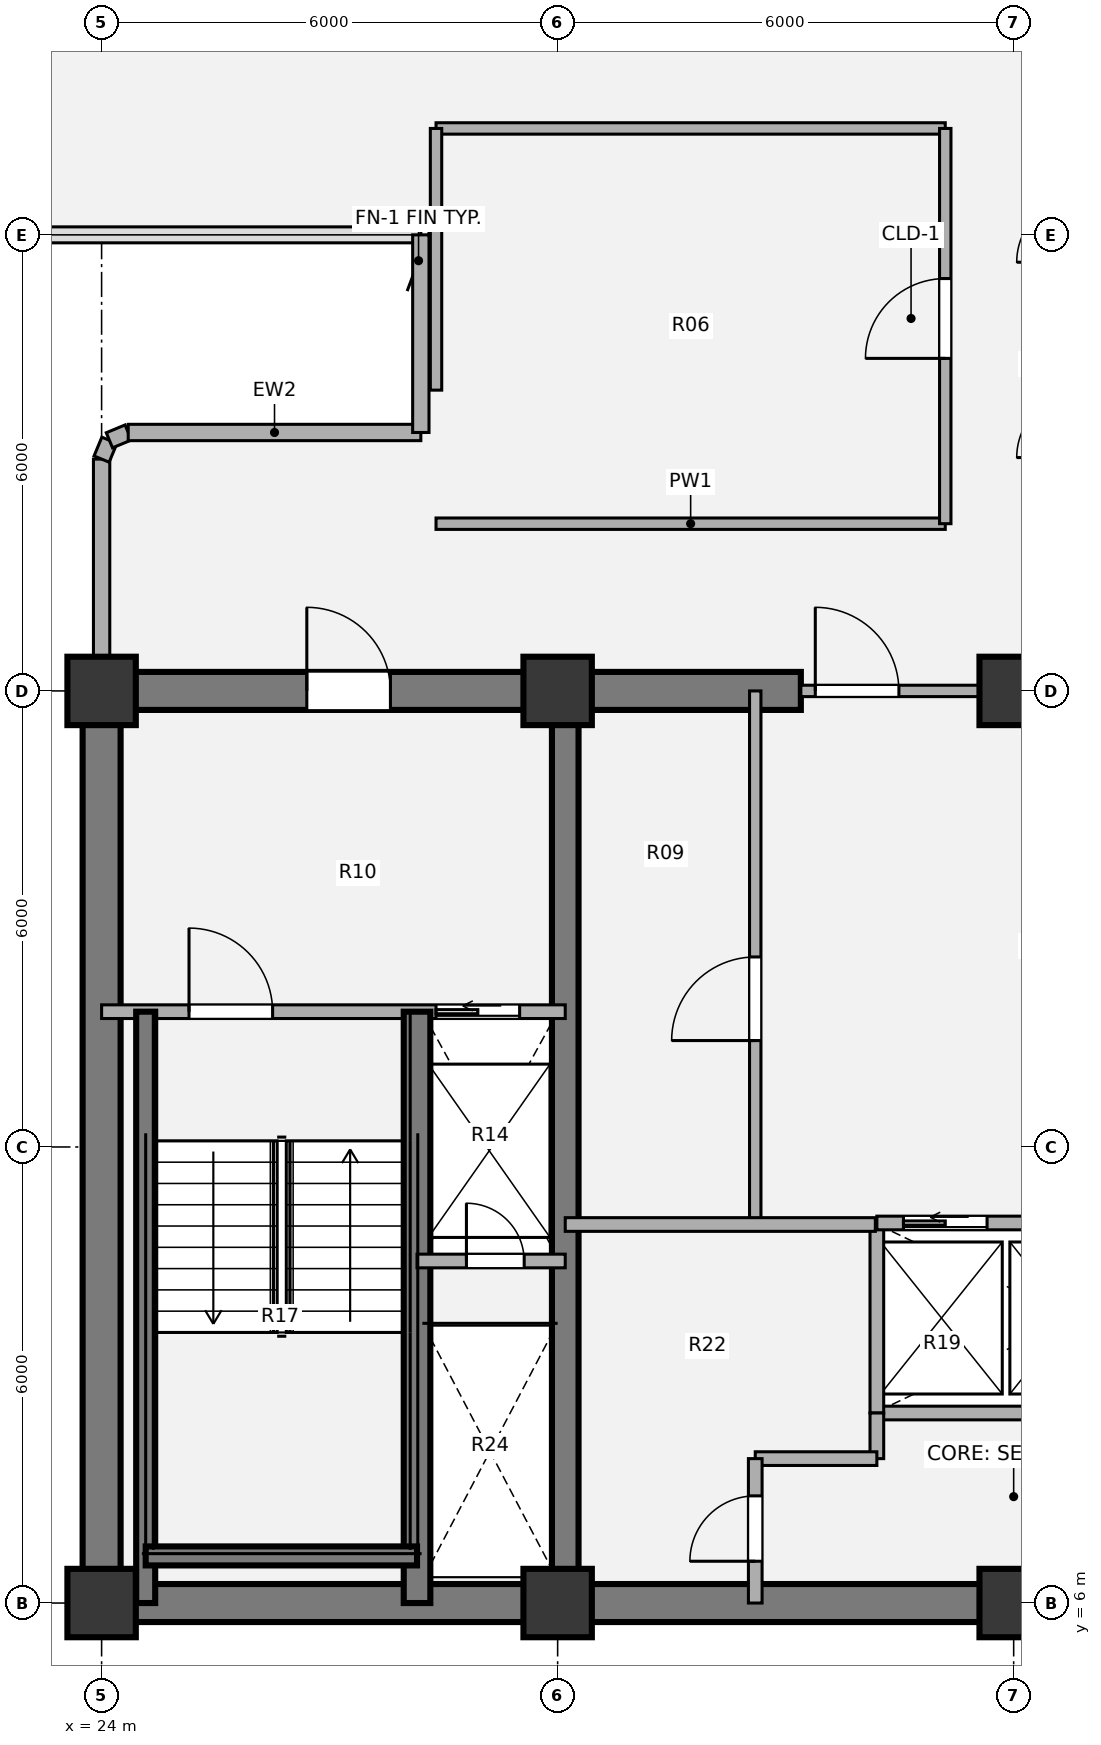
"""IFC4 building model, lengths in metres.
Left out: names, types, materials, properties, quantities, classifications, styles, units other than length and angle.
Written with IfcOpenShell. Run it as: python <this file> out.ifc"""

import sys

from ifc_helpers import new_model, si_unit, direction, frame, frame_2d, origin, origin_2d, place, context, subcontext, project, spatial, rectangle, extrude, source, transform, mapped, element, fill, save


model = new_model("IFC4")
c1 = context("Model", 3, precision=1e-05, world=origin(), true_north=direction((0.0, 1.0)))
c2 = subcontext(c1, "Body", "Model", "MODEL_VIEW")
j1 = project(units=[si_unit("LENGTHUNIT", "METRE"), si_unit("PLANEANGLEUNIT", "RADIAN")], contexts=[c1])
p1 = place(None, origin())
s1 = spatial("IfcSite", under=j1, at=p1, CompositionType="ELEMENT")
p2 = place(p1, origin())
s2 = spatial("IfcBuilding", under=s1, at=p2, CompositionType="ELEMENT")
p3 = place(p2, frame((0.0, 0.0, 123.84)))
s3 = spatial("IfcBuildingStorey", under=s2, at=p3, CompositionType="ELEMENT", Elevation=123.84)
m1 = source(origin(), c2, "Body", "SweptSolid", [
    extrude(rectangle(XDim=0.9, YDim=0.9, at=origin_2d()), origin(), (0.0, 0.0, 1.0), 3.78),
])
for number, where, z_axis, x_axis in (
    (1, (24.0, 6.0, 0.0), (0.0, 0.0, 1.0), (1.0, 0.0, 0.0)),
    (2, (30.0, 6.0, 0.0), (0.0, 0.0, 1.0), (1.0, 0.0, 0.0)),
    (3, (36.0, 6.0, 0.0), (0.0, 0.0, 1.0), (1.0, 0.0, 0.0)),
    (4, (24.0, 18.0, 0.0), (0.0, 0.0, 1.0), (1.0, 0.0, 0.0)),
    (5, (30.0, 18.0, 0.0), (0.0, 0.0, 1.0), (1.0, 0.0, 0.0)),
    (6, (36.0, 18.0, 0.0), (0.0, 0.0, 1.0), (1.0, 0.0, 0.0)),
):
    element("IfcColumn", number, at=place(p3, frame(where, z_axis=z_axis, x_axis=x_axis)), inside=s3, PredefinedType="COLUMN", context=c2, shape_type="MappedRepresentation", body=[
        mapped(m1, transform((0.0, 0.0, 0.0), x_axis=(1.0, 0.0, 0.0), y_axis=(0.0, 1.0, 0.0), z_axis=(0.0, 0.0, 1.0), scale=1.0)),
    ])
p4 = place(p3, frame((48.25, 6.0, 0.0), z_axis=(0.0, 0.0, 1.0), x_axis=(-1.0, 0.0, 0.0)))
e7 = element("IfcWall", 7, at=p4, inside=s3, PredefinedType="SHEAR", context=c2, shape_type="SweptSolid", body=[
    extrude(rectangle(XDim=24.5, YDim=0.5, at=frame_2d((12.25, 0.0))), origin(), (0.0, 0.0, 1.0), 3.78),
])
p5 = place(p3, frame((24.0, 6.0, 0.0), z_axis=(0.0, 0.0, 1.0), x_axis=(0.0, 1.0, 0.0)))
e8 = element("IfcWall", 8, at=p5, inside=s3, PredefinedType="SHEAR", context=c2, shape_type="SweptSolid", body=[
    extrude(rectangle(XDim=12.0, YDim=0.5, at=frame_2d((6.0, 0.0))), origin(), (0.0, 0.0, 1.0), 3.78),
])
p6 = place(p3, frame((23.75, 18.0, 0.0), z_axis=(0.0, 0.0, 1.0), x_axis=(1.0, 0.0, 0.0)))
e9 = element("IfcWall", 9, at=p6, inside=s3, PredefinedType="SHEAR", context=c2, shape_type="SweptSolid", body=[
    extrude(rectangle(XDim=9.45, YDim=0.5, at=frame_2d((4.725, 0.0))), origin(), (0.0, 0.0, 1.0), 3.78),
])
p7 = place(p6, frame((2.95, 0.0, 0.0)))
e10 = element("IfcOpeningElement", 10, at=p7, cuts=e9, PredefinedType="OPENING", context=c2, shape_type="SweptSolid", body=[
    extrude(rectangle(XDim=1.1, YDim=2.1, at=origin_2d()), frame((0.55, 0.26, 1.05), z_axis=(0.0, -1.0, 0.0), x_axis=(1.0, 0.0, 0.0)), (0.0, 0.0, 1.0), 0.52),
])
p8 = place(p3, frame((30.1, 6.0, 0.0), z_axis=(0.0, 0.0, 1.0), x_axis=(0.0, 1.0, 0.0)))
e11 = element("IfcWall", 11, at=p8, inside=s3, PredefinedType="SHEAR", context=c2, shape_type="SweptSolid", body=[
    extrude(rectangle(XDim=12.0, YDim=0.35, at=frame_2d((6.0, 0.0))), origin(), (0.0, 0.0, 1.0), 3.78),
])
p9 = place(p3, frame((24.0, 18.43, 0.0), z_axis=(0.0, 0.0, 1.0), x_axis=(0.0, 1.0, 0.0)))
e12 = element("IfcWall", 12, at=p9, inside=s3, PredefinedType="SOLIDWALL", context=c2, shape_type="SweptSolid", body=[
    extrude(rectangle(XDim=2.62, YDim=0.215, at=frame_2d((1.31, 0.0))), origin(), (0.0, 0.0, 1.0), 3.53),
])
p10 = place(p3, frame((24.0, 21.05, 0.0), z_axis=(0.0, 0.0, 1.0), x_axis=(0.382673670509, 0.923883575944, 0.0)))
e13 = element("IfcWall", 13, at=p10, inside=s3, PredefinedType="SOLIDWALL", context=c2, shape_type="SweptSolid", body=[
    extrude(rectangle(XDim=0.268, YDim=0.215, at=frame_2d((0.134, 0.0))), origin(), (0.0, 0.0, 1.0), 3.53),
])
p11 = place(p3, frame((24.103, 21.298, 0.0), z_axis=(0.0, 0.0, 1.0), x_axis=(0.924205486139, 0.381895560841, 0.0)))
e14 = element("IfcWall", 14, at=p11, inside=s3, PredefinedType="SOLIDWALL", context=c2, shape_type="SweptSolid", body=[
    extrude(rectangle(XDim=0.268, YDim=0.215, at=frame_2d((0.134, 0.0))), origin(), (0.0, 0.0, 1.0), 3.53),
])
p12 = place(p3, frame((24.35, 21.4, 0.0), z_axis=(0.0, 0.0, 1.0), x_axis=(1.0, 0.0, 0.0)))
e15 = element("IfcWall", 15, at=p12, inside=s3, PredefinedType="SOLIDWALL", context=c2, shape_type="SweptSolid", body=[
    extrude(rectangle(XDim=3.85, YDim=0.215, at=frame_2d((1.925, 0.0))), origin(), (0.0, 0.0, 1.0), 3.53),
])
p13 = place(p3, frame((28.2, 21.4, 0.0), z_axis=(0.0, 0.0, 1.0), x_axis=(0.0, 1.0, 0.0)))
e16 = element("IfcWall", 16, at=p13, inside=s3, PredefinedType="SOLIDWALL", context=c2, shape_type="SweptSolid", body=[
    extrude(rectangle(XDim=2.6, YDim=0.215, at=frame_2d((1.3, 0.0))), origin(), (0.0, 0.0, 1.0), 3.53),
])
p14 = place(p3, frame((32.6, 11.0, 0.0), z_axis=(0.0, 0.0, 1.0), x_axis=(0.0, 1.0, 0.0)))
e17 = element("IfcWall", 17, at=p14, inside=s3, PredefinedType="PARTITIONING", context=c2, shape_type="SweptSolid", body=[
    extrude(rectangle(XDim=7.0, YDim=0.15, at=frame_2d((3.5, 0.0))), origin(), (0.0, 0.0, 1.0), 3.5),
])
p15 = place(p14, frame((2.4, 0.0, 0.0)))
e18 = element("IfcOpeningElement", 18, at=p15, cuts=e17, PredefinedType="OPENING", context=c2, shape_type="SweptSolid", body=[
    extrude(rectangle(XDim=1.1, YDim=2.1, at=origin_2d()), frame((0.55, 0.085, 1.05), z_axis=(0.0, -1.0, 0.0), x_axis=(1.0, 0.0, 0.0)), (0.0, 0.0, 1.0), 0.17),
])
p16 = place(p3, frame((34.2, 8.5, 0.0), z_axis=(0.0, 0.0, 1.0), x_axis=(1.0, 0.0, 0.0)))
e19 = element("IfcWall", 19, at=p16, inside=s3, PredefinedType="PARTITIONING", context=c2, shape_type="SweptSolid", body=[
    extrude(rectangle(XDim=5.15, YDim=0.18, at=frame_2d((2.575, 0.0))), origin(), (0.0, 0.0, 1.0), 3.5),
])
p17 = place(p3, frame((34.2, 8.5, 0.0), z_axis=(0.0, 0.0, 1.0), x_axis=(0.0, 1.0, 0.0)))
e20 = element("IfcWall", 20, at=p17, inside=s3, PredefinedType="PARTITIONING", context=c2, shape_type="SweptSolid", body=[
    extrude(rectangle(XDim=2.5, YDim=0.18, at=frame_2d((1.25, 0.0))), origin(), (0.0, 0.0, 1.0), 3.5),
])
p18 = place(p3, frame((30.1, 10.98, 0.0), z_axis=(0.0, 0.0, 1.0), x_axis=(1.0, 0.0, 0.0)))
e21 = element("IfcWall", 21, at=p18, inside=s3, PredefinedType="PARTITIONING", context=c2, shape_type="SweptSolid", body=[
    extrude(rectangle(XDim=4.08, YDim=0.18, at=frame_2d((2.04, 0.0))), origin(), (0.0, 0.0, 1.0), 3.5),
])
p19 = place(p3, frame((34.2, 7.9, 0.0), z_axis=(0.0, 0.0, 1.0), x_axis=(0.0, 1.0, 0.0)))
e22 = element("IfcWall", 22, at=p19, inside=s3, PredefinedType="PARTITIONING", context=c2, shape_type="SweptSolid", body=[
    extrude(rectangle(XDim=0.6, YDim=0.18, at=frame_2d((0.3, 0.0))), origin(), (0.0, 0.0, 1.0), 3.5),
])
p20 = place(p3, frame((32.6, 7.9, 0.0), z_axis=(0.0, 0.0, 1.0), x_axis=(1.0, 0.0, 0.0)))
e23 = element("IfcWall", 23, at=p20, inside=s3, PredefinedType="PARTITIONING", context=c2, shape_type="SweptSolid", body=[
    extrude(rectangle(XDim=1.6, YDim=0.18, at=frame_2d((0.8, 0.0))), origin(), (0.0, 0.0, 1.0), 3.5),
])
p21 = place(p3, frame((32.6, 6.0, 0.0), z_axis=(0.0, 0.0, 1.0), x_axis=(0.0, 1.0, 0.0)))
e24 = element("IfcWall", 24, at=p21, inside=s3, PredefinedType="PARTITIONING", context=c2, shape_type="SweptSolid", body=[
    extrude(rectangle(XDim=1.9, YDim=0.18, at=frame_2d((0.95, 0.0))), origin(), (0.0, 0.0, 1.0), 3.5),
])
p22 = place(p21, frame((0.55, 0.0, 0.0)))
e25 = element("IfcOpeningElement", 25, at=p22, cuts=e24, PredefinedType="OPENING", context=c2, shape_type="SweptSolid", body=[
    extrude(rectangle(XDim=0.86, YDim=2.1, at=origin_2d()), frame((0.43, 0.1, 1.05), z_axis=(0.0, -1.0, 0.0), x_axis=(1.0, 0.0, 0.0)), (0.0, 0.0, 1.0), 0.2),
])
p23 = place(p3, frame((33.2, 18.0, 0.0), z_axis=(0.0, 0.0, 1.0), x_axis=(1.0, 0.0, 0.0)))
e26 = element("IfcWall", 26, at=p23, inside=s3, PredefinedType="PARTITIONING", context=c2, shape_type="SweptSolid", body=[
    extrude(rectangle(XDim=5.6, YDim=0.15, at=frame_2d((2.8, 0.0))), origin(), (0.0, 0.0, 1.0), 2.315),
])
p24 = place(p23, frame((0.19, 0.0, 0.0)))
e27 = element("IfcOpeningElement", 27, at=p24, cuts=e26, PredefinedType="OPENING", context=c2, shape_type="SweptSolid", body=[
    extrude(rectangle(XDim=1.1, YDim=2.1, at=origin_2d()), frame((0.55, 0.085, 1.05), z_axis=(0.0, -1.0, 0.0), x_axis=(1.0, 0.0, 0.0)), (0.0, 0.0, 1.0), 0.17),
])
p25 = place(p23, frame((4.31, 0.0, 0.0)))
e28 = element("IfcOpeningElement", 28, at=p25, cuts=e26, PredefinedType="OPENING", context=c2, shape_type="SweptSolid", body=[
    extrude(rectangle(XDim=1.1, YDim=2.1, at=origin_2d()), frame((0.55, 0.085, 1.05), z_axis=(0.0, -1.0, 0.0), x_axis=(1.0, 0.0, 0.0)), (0.0, 0.0, 1.0), 0.17),
])
p26 = place(p3, frame((24.0, 13.78, 0.0), z_axis=(0.0, 0.0, 1.0), x_axis=(1.0, 0.0, 0.0)))
e29 = element("IfcWall", 29, at=p26, inside=s3, PredefinedType="PARTITIONING", context=c2, shape_type="SweptSolid", body=[
    extrude(rectangle(XDim=6.1, YDim=0.18, at=frame_2d((3.05, 0.0))), origin(), (0.0, 0.0, 1.0), 3.5),
])
p27 = place(p26, frame((1.15, 0.0, 0.0)))
e30 = element("IfcOpeningElement", 30, at=p27, cuts=e29, PredefinedType="OPENING", context=c2, shape_type="SweptSolid", body=[
    extrude(rectangle(XDim=1.1, YDim=2.1, at=origin_2d()), frame((0.55, 0.1, 1.05), z_axis=(0.0, -1.0, 0.0), x_axis=(1.0, 0.0, 0.0)), (0.0, 0.0, 1.0), 0.2),
])
p28 = place(p26, frame((4.4, 0.0, 0.0)))
e31 = element("IfcOpeningElement", 31, at=p28, cuts=e29, PredefinedType="OPENING", context=c2, shape_type="SweptSolid", body=[
    extrude(rectangle(XDim=1.1, YDim=2.1, at=origin_2d()), frame((0.55, 0.1, 1.05), z_axis=(0.0, -1.0, 0.0), x_axis=(1.0, 0.0, 0.0)), (0.0, 0.0, 1.0), 0.2),
])
p29 = place(p3, frame((28.15, 6.0, 0.0), z_axis=(0.0, 0.0, 1.0), x_axis=(0.0, 1.0, 0.0)))
e32 = element("IfcWall", 32, at=p29, inside=s3, PredefinedType="SHEAR", context=c2, shape_type="SweptSolid", body=[
    extrude(rectangle(XDim=7.78, YDim=0.35, at=frame_2d((3.89, 0.0))), origin(), (0.0, 0.0, 1.0), 3.85),
])
p30 = place(p3, frame((24.58, 6.0, 0.0), z_axis=(0.0, 0.0, 1.0), x_axis=(0.0, 1.0, 0.0)))
e33 = element("IfcWall", 33, at=p30, inside=s3, PredefinedType="SHEAR", context=c2, shape_type="SweptSolid", body=[
    extrude(rectangle(XDim=7.78, YDim=0.25, at=frame_2d((3.89, 0.0))), origin(), (0.0, 0.0, 1.0), 3.85),
])
p31 = place(p3, frame((24.58, 6.62, 0.0), z_axis=(0.0, 0.0, 1.0), x_axis=(1.0, 0.0, 0.0)))
e34 = element("IfcWall", 34, at=p31, inside=s3, PredefinedType="SHEAR", context=c2, shape_type="SweptSolid", body=[
    extrude(rectangle(XDim=3.57, YDim=0.25, at=frame_2d((1.785, 0.0))), origin(), (0.0, 0.0, 1.0), 3.85),
])
p32 = place(p3, frame((28.15, 10.5, 0.0), z_axis=(0.0, 0.0, 1.0), x_axis=(1.0, 0.0, 0.0)))
e35 = element("IfcWall", 35, at=p32, inside=s3, PredefinedType="PARTITIONING", context=c2, shape_type="SweptSolid", body=[
    extrude(rectangle(XDim=1.95, YDim=0.18, at=frame_2d((0.975, 0.0))), origin(), (0.0, 0.0, 1.0), 3.5),
])
p33 = place(p32, frame((0.65, 0.0, 0.0)))
e36 = element("IfcOpeningElement", 36, at=p33, cuts=e35, PredefinedType="OPENING", context=c2, shape_type="SweptSolid", body=[
    extrude(rectangle(XDim=0.76, YDim=2.05, at=origin_2d()), frame((0.38, 0.1, 1.025), z_axis=(0.0, -1.0, 0.0), x_axis=(1.0, 0.0, 0.0)), (0.0, 0.0, 1.0), 0.2),
])
p34 = place(p3, frame((34.2, 11.0, 0.0), z_axis=(0.0, 0.0, 1.0), x_axis=(1.0, 0.0, 0.0)))
e37 = element("IfcWall", 37, at=p34, inside=s3, PredefinedType="PARTITIONING", context=c2, shape_type="SweptSolid", body=[
    extrude(rectangle(XDim=5.15, YDim=0.18, at=frame_2d((2.575, 0.0))), origin(), (0.0, 0.0, 1.0), 3.5),
])
p35 = place(p34, frame((0.35, 0.0, 0.0)))
e38 = element("IfcOpeningElement", 38, at=p35, cuts=e37, PredefinedType="OPENING", context=c2, shape_type="SweptSolid", body=[
    extrude(rectangle(XDim=1.1, YDim=2.1, at=origin_2d()), frame((0.55, 0.1, 1.05), z_axis=(0.0, -1.0, 0.0), x_axis=(1.0, 0.0, 0.0)), (0.0, 0.0, 1.0), 0.2),
])
p36 = place(p34, frame((2.05, 0.0, 0.0)))
e39 = element("IfcOpeningElement", 39, at=p36, cuts=e37, PredefinedType="OPENING", context=c2, shape_type="SweptSolid", body=[
    extrude(rectangle(XDim=1.1, YDim=2.1, at=origin_2d()), frame((0.55, 0.1, 1.05), z_axis=(0.0, -1.0, 0.0), x_axis=(1.0, 0.0, 0.0)), (0.0, 0.0, 1.0), 0.2),
])
p37 = place(p34, frame((3.7, 0.0, 0.0)))
e40 = element("IfcOpeningElement", 40, at=p37, cuts=e37, PredefinedType="OPENING", context=c2, shape_type="SweptSolid", body=[
    extrude(rectangle(XDim=1.1, YDim=2.1, at=origin_2d()), frame((0.55, 0.1, 1.05), z_axis=(0.0, -1.0, 0.0), x_axis=(1.0, 0.0, 0.0)), (0.0, 0.0, 1.0), 0.2),
])
for number, where, z_axis, x_axis in (
    (41, (28.4, 20.2, 0.0), (0.0, 0.0, 1.0), (1.0, 0.0, 0.0)),
    (42, (28.4, 25.4, 0.0), (0.0, 0.0, 1.0), (1.0, 0.0, 0.0)),
):
    element("IfcWall", number, at=place(p3, frame(where, z_axis=z_axis, x_axis=x_axis)), inside=s3, PredefinedType="PARTITIONING", context=c2, shape_type="SweptSolid", body=[
        extrude(rectangle(XDim=6.7, YDim=0.15, at=frame_2d((3.35, 0.0))), origin(), (0.0, 0.0, 1.0), 3.5),
    ])
p38 = place(p3, frame((28.4, 21.957, 0.0), z_axis=(0.0, 0.0, 1.0), x_axis=(0.0, 1.0, 0.0)))
e43 = element("IfcWall", 43, at=p38, inside=s3, PredefinedType="PARTITIONING", context=c2, shape_type="SweptSolid", body=[
    extrude(rectangle(XDim=3.443, YDim=0.15, at=frame_2d((1.721, 0.0))), origin(), (0.0, 0.0, 1.0), 3.5),
])
p39 = place(p3, frame((35.1, 20.2, 0.0), z_axis=(0.0, 0.0, 1.0), x_axis=(0.0, 1.0, 0.0)))
e44 = element("IfcWall", 44, at=p39, inside=s3, PredefinedType="PARTITIONING", context=c2, shape_type="SweptSolid", body=[
    extrude(rectangle(XDim=5.2, YDim=0.15, at=frame_2d((2.6, 0.0))), origin(), (0.0, 0.0, 1.0), 3.5),
])
p40 = place(p39, frame((2.175, 0.0, 0.0)))
e45 = element("IfcOpeningElement", 45, at=p40, cuts=e44, PredefinedType="OPENING", context=c2, shape_type="SweptSolid", body=[
    extrude(rectangle(XDim=1.05, YDim=2.1, at=origin_2d()), frame((0.525, 0.085, 1.05), z_axis=(0.0, -1.0, 0.0), x_axis=(1.0, 0.0, 0.0)), (0.0, 0.0, 1.0), 0.17),
])
m2 = source(origin(), c2, "Body", "SweptSolid", [
    extrude(rectangle(XDim=1.1, YDim=2.1, at=origin_2d()), frame((0.55, 0.025, 1.05), z_axis=(0.0, -1.0, 0.0), x_axis=(1.0, 0.0, 0.0)), (0.0, 0.0, 1.0), 0.05),
])
p41 = place(p15, origin())
e46 = element("IfcDoor", 46, at=p41, inside=s3, OperationType="SINGLE_SWING_LEFT", PredefinedType="DOOR", context=c2, shape_type="MappedRepresentation", body=[
    mapped(m2, transform((0.0, 0.0, 0.0), x_axis=(1.0, 0.0, 0.0), y_axis=(0.0, 1.0, 0.0), z_axis=(0.0, 0.0, 1.0), scale=1.0)),
])
fill(e18, e46)
m3 = source(origin(), c2, "Body", "SweptSolid", [
    extrude(rectangle(XDim=0.86, YDim=2.1, at=origin_2d()), frame((0.43, 0.025, 1.05), z_axis=(0.0, -1.0, 0.0), x_axis=(1.0, 0.0, 0.0)), (0.0, 0.0, 1.0), 0.05),
])
p42 = place(p22, origin())
e47 = element("IfcDoor", 47, at=p42, inside=s3, OperationType="SINGLE_SWING_LEFT", PredefinedType="DOOR", context=c2, shape_type="MappedRepresentation", body=[
    mapped(m3, transform((0.0, 0.0, 0.0), x_axis=(1.0, 0.0, 0.0), y_axis=(0.0, 1.0, 0.0), z_axis=(0.0, 0.0, 1.0), scale=1.0)),
])
fill(e25, e47)
m4 = source(origin(), c2, "Body", "SweptSolid", [
    extrude(rectangle(XDim=1.1, YDim=2.1, at=origin_2d()), frame((0.55, 0.025, 1.05), z_axis=(0.0, -1.0, 0.0), x_axis=(1.0, 0.0, 0.0)), (0.0, 0.0, 1.0), 0.05),
])
p43 = place(p24, origin())
e48 = element("IfcDoor", 48, at=p43, inside=s3, OperationType="SINGLE_SWING_LEFT", PredefinedType="DOOR", context=c2, shape_type="MappedRepresentation", body=[
    mapped(m4, transform((0.0, 0.0, 0.0), x_axis=(1.0, 0.0, 0.0), y_axis=(0.0, 1.0, 0.0), z_axis=(0.0, 0.0, 1.0), scale=1.0)),
])
fill(e27, e48)
m5 = source(origin(), c2, "Body", "SweptSolid", [
    extrude(rectangle(XDim=1.1, YDim=2.1, at=origin_2d()), frame((0.55, 0.025, 1.05), z_axis=(0.0, -1.0, 0.0), x_axis=(1.0, 0.0, 0.0)), (0.0, 0.0, 1.0), 0.05),
])
p44 = place(p27, origin())
e49 = element("IfcDoor", 49, at=p44, inside=s3, OperationType="SINGLE_SWING_LEFT", PredefinedType="DOOR", context=c2, shape_type="MappedRepresentation", body=[
    mapped(m5, transform((0.0, 0.0, 0.0), x_axis=(1.0, 0.0, 0.0), y_axis=(0.0, 1.0, 0.0), z_axis=(0.0, 0.0, 1.0), scale=1.0)),
])
fill(e30, e49)
m6 = source(origin(), c2, "Body", "SweptSolid", [
    extrude(rectangle(XDim=1.1, YDim=2.1, at=origin_2d()), frame((0.55, 0.025, 1.05), z_axis=(0.0, -1.0, 0.0), x_axis=(1.0, 0.0, 0.0)), (0.0, 0.0, 1.0), 0.05),
])
p45 = place(p28, origin())
e50 = element("IfcDoor", 50, at=p45, inside=s3, OperationType="SLIDING_TO_LEFT", PredefinedType="DOOR", context=c2, shape_type="MappedRepresentation", body=[
    mapped(m6, transform((0.0, 0.0, 0.0), x_axis=(1.0, 0.0, 0.0), y_axis=(0.0, 1.0, 0.0), z_axis=(0.0, 0.0, 1.0), scale=1.0)),
])
fill(e31, e50)
m7 = source(origin(), c2, "Body", "SweptSolid", [
    extrude(rectangle(XDim=0.76, YDim=2.05, at=origin_2d()), frame((0.38, 0.025, 1.025), z_axis=(0.0, -1.0, 0.0), x_axis=(1.0, 0.0, 0.0)), (0.0, 0.0, 1.0), 0.05),
])
p46 = place(p33, origin())
e51 = element("IfcDoor", 51, at=p46, inside=s3, OperationType="SINGLE_SWING_LEFT", PredefinedType="DOOR", context=c2, shape_type="MappedRepresentation", body=[
    mapped(m7, transform((0.0, 0.0, 0.0), x_axis=(1.0, 0.0, 0.0), y_axis=(0.0, 1.0, 0.0), z_axis=(0.0, 0.0, 1.0), scale=1.0)),
])
fill(e36, e51)
p47 = place(p7, origin())
e52 = element("IfcDoor", 52, at=p47, inside=s3, OperationType="SINGLE_SWING_LEFT", PredefinedType="DOOR", context=c2, shape_type="MappedRepresentation", body=[
    mapped(m4, transform((0.0, 0.0, 0.0), x_axis=(1.0, 0.0, 0.0), y_axis=(0.0, 1.0, 0.0), z_axis=(0.0, 0.0, 1.0), scale=1.0)),
])
fill(e10, e52)
p48 = place(p35, origin())
e53 = element("IfcDoor", 53, at=p48, inside=s3, OperationType="SLIDING_TO_LEFT", PredefinedType="DOOR", context=c2, shape_type="MappedRepresentation", body=[
    mapped(m6, transform((0.0, 0.0, 0.0), x_axis=(1.0, 0.0, 0.0), y_axis=(0.0, 1.0, 0.0), z_axis=(0.0, 0.0, 1.0), scale=1.0)),
])
fill(e38, e53)
m8 = source(origin(), c2, "Body", "SweptSolid", [
    extrude(rectangle(XDim=1.05, YDim=2.1, at=origin_2d()), frame((0.525, 0.025, 1.05), z_axis=(0.0, -1.0, 0.0), x_axis=(1.0, 0.0, 0.0)), (0.0, 0.0, 1.0), 0.05),
])
p49 = place(p40, origin())
e54 = element("IfcDoor", 54, at=p49, inside=s3, OperationType="SINGLE_SWING_LEFT", PredefinedType="DOOR", context=c2, shape_type="MappedRepresentation", body=[
    mapped(m8, transform((0.0, 0.0, 0.0), x_axis=(1.0, 0.0, 0.0), y_axis=(0.0, 1.0, 0.0), z_axis=(0.0, 0.0, 1.0), scale=1.0)),
])
fill(e45, e54)
save(model, sys.argv[1])
